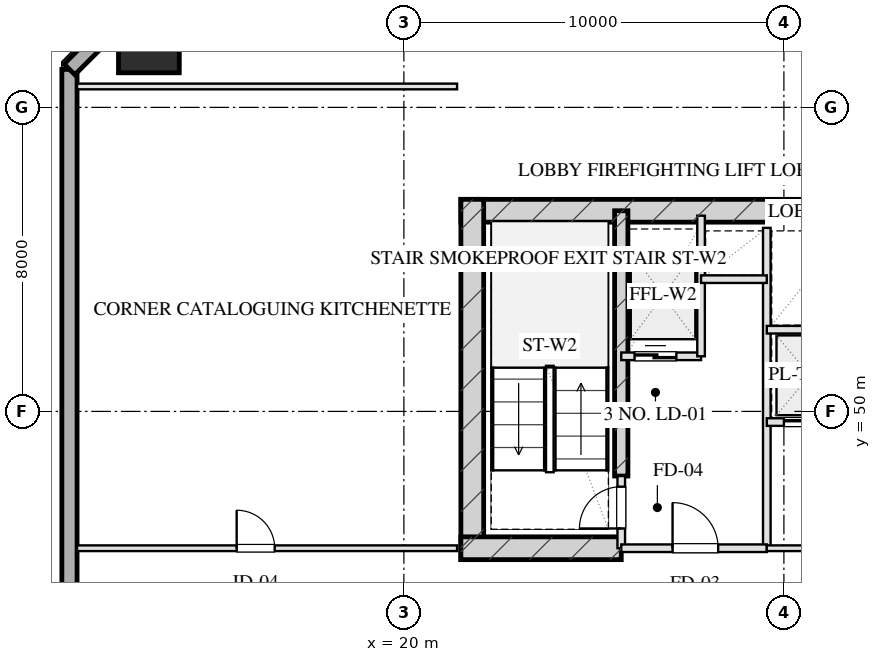
"""IFC4 building model, lengths in metres.
Left out: names, types, materials, properties, quantities, classifications, styles, units other than length and angle.
Written with IfcOpenShell. Run it as: python <this file> out.ifc"""

import sys

from ifc_helpers import new_model, si_unit, direction, frame, frame_2d, origin, origin_2d, place, context, subcontext, project, spatial, rectangle, hollow_rectangle, extrude, element, fill, save


model = new_model("IFC4")
c1 = context("Model", 3, precision=1e-05, world=origin(), true_north=direction((0.0, 1.0)))
c2 = subcontext(c1, "Body", "Model", "MODEL_VIEW")
j1 = project(units=[si_unit("LENGTHUNIT", "METRE"), si_unit("PLANEANGLEUNIT", "RADIAN")], contexts=[c1])
p1 = place(None, origin())
s1 = spatial("IfcSite", under=j1, at=p1, CompositionType="ELEMENT")
p2 = place(p1, origin())
s2 = spatial("IfcBuilding", under=s1, at=p2, CompositionType="ELEMENT")
p3 = place(p2, frame((0.0, 0.0, 117.3)))
s3 = spatial("IfcBuildingStorey", under=s2, at=p3, CompositionType="ELEMENT", Elevation=117.3)
p4 = place(p3, frame((21.5, 55.28, 0.0), z_axis=(0.0, 0.0, 1.0), x_axis=(1.0, 0.0, 0.0)))
e1 = element("IfcWall", 1, at=p4, inside=s3, PredefinedType="SHEAR", context=c2, shape_type="SweptSolid", body=[
    extrude(rectangle(XDim=17.0, YDim=0.6, at=frame_2d((8.5, 0.0))), origin(), (0.0, 0.0, 1.0), 3.45),
])
p5 = place(p3, frame((21.8, 46.1, 0.0), z_axis=(0.0, 0.0, 1.0), x_axis=(0.0, 1.0, 0.0)))
e2 = element("IfcWall", 2, at=p5, inside=s3, PredefinedType="SHEAR", context=c2, shape_type="SweptSolid", body=[
    extrude(rectangle(XDim=9.48, YDim=0.6, at=frame_2d((4.74, 0.0))), origin(), (0.0, 0.0, 1.0), 3.45),
])
p6 = place(p3, frame((25.72, 48.3, 0.0), z_axis=(0.0, 0.0, 1.0), x_axis=(0.0, 1.0, 0.0)))
e3 = element("IfcWall", 3, at=p6, inside=s3, PredefinedType="SHEAR", context=c2, shape_type="SweptSolid", body=[
    extrude(rectangle(XDim=6.98, YDim=0.35, at=frame_2d((3.49, 0.0))), origin(), (0.0, 0.0, 1.0), 3.45),
])
p7 = place(p3, frame((21.5, 46.4, 0.0), z_axis=(0.0, 0.0, 1.0), x_axis=(1.0, 0.0, 0.0)))
e4 = element("IfcWall", 4, at=p7, inside=s3, PredefinedType="SHEAR", context=c2, shape_type="SweptSolid", body=[
    extrude(rectangle(XDim=4.22, YDim=0.6, at=frame_2d((2.11, 0.0))), origin(), (0.0, 0.0, 1.0), 3.45),
])
p8 = place(p3, frame((13.29, 59.71, 0.0), z_axis=(0.0, 0.0, 1.0), x_axis=(1.0, 0.0, 0.0)))
e5 = element("IfcColumn", 5, at=p8, inside=s3, PredefinedType="COLUMN", context=c2, shape_type="SweptSolid", body=[
    extrude(hollow_rectangle(XDim=1.6, YDim=1.6, WallThickness=0.055, at=origin_2d()), origin(), (0.0, 0.0, 1.0), 3.451),
])
p9 = place(p3, frame((11.2, 9.0, 0.0), z_axis=(0.0, 0.0, 1.0), x_axis=(0.0, 1.0, 0.0)))
e6 = element("IfcWall", 6, at=p9, inside=s3, PredefinedType="SOLIDWALL", context=c2, shape_type="SweptSolid", body=[
    extrude(rectangle(XDim=50.0, YDim=0.4, at=frame_2d((25.0, 0.0))), origin(), (0.0, 0.0, 1.0), 2.61),
])
p10 = place(p9, frame((17.4, 0.0, 0.75)))
e7 = element("IfcOpeningElement", 7, at=p10, cuts=e6, PredefinedType="OPENING", context=c2, shape_type="SweptSolid", body=[
    extrude(rectangle(XDim=2.4, YDim=1.46, at=frame_2d((1.2, 0.73))), frame((0.0, 0.21, 0.0), z_axis=(0.0, -1.0, 0.0), x_axis=(1.0, 0.0, 0.0)), (0.0, 0.0, 1.0), 0.42),
])
p11 = place(p9, frame((30.2, 0.0, 0.75)))
e8 = element("IfcOpeningElement", 8, at=p11, cuts=e6, PredefinedType="OPENING", context=c2, shape_type="SweptSolid", body=[
    extrude(rectangle(XDim=2.4, YDim=1.46, at=frame_2d((1.2, 0.73))), frame((0.0, 0.21, 0.0), z_axis=(0.0, -1.0, 0.0), x_axis=(1.0, 0.0, 0.0)), (0.0, 0.0, 1.0), 0.42),
])
p12 = place(p3, frame((11.2, 59.0, 0.0), z_axis=(0.0, 0.0, 1.0), x_axis=(0.707106781187, 0.707106781187, 0.0)))
e9 = element("IfcWall", 9, at=p12, inside=s3, PredefinedType="SOLIDWALL", context=c2, shape_type="SweptSolid", body=[
    extrude(rectangle(XDim=3.96, YDim=0.4, at=frame_2d((1.98, 0.0))), origin(), (0.0, 0.0, 1.0), 2.61),
])
p13 = place(p3, frame((25.72, 46.4, 0.0), z_axis=(0.0, 0.0, 1.0), x_axis=(0.0, 1.0, 0.0)))
e10 = element("IfcWall", 10, at=p13, inside=s3, PredefinedType="PARTITIONING", context=c2, shape_type="SweptSolid", body=[
    extrude(rectangle(XDim=1.9, YDim=0.2, at=frame_2d((0.95, 0.0))), origin(), (0.0, 0.0, 1.0), 3.175),
])
p14 = place(p13, frame((0.52, 0.0, 0.0)))
e11 = element("IfcOpeningElement", 11, at=p14, cuts=e10, PredefinedType="OPENING", context=c2, shape_type="SweptSolid", body=[
    extrude(rectangle(XDim=1.1, YDim=2.05, at=frame_2d((0.55, 1.025))), frame((0.0, 0.11, 0.0), z_axis=(0.0, -1.0, 0.0), x_axis=(1.0, 0.0, 0.0)), (0.0, 0.0, 1.0), 0.22),
])
p15 = place(p3, frame((29.55, 46.4, 0.0), z_axis=(0.0, 0.0, 1.0), x_axis=(0.0, 1.0, 0.0)))
e12 = element("IfcWall", 12, at=p15, inside=s3, PredefinedType="PARTITIONING", context=c2, shape_type="SweptSolid", body=[
    extrude(rectangle(XDim=8.43, YDim=0.2, at=frame_2d((4.215, 0.0))), origin(), (0.0, 0.0, 1.0), 3.175),
])
p16 = place(p3, frame((25.72, 46.4, 0.0), z_axis=(0.0, 0.0, 1.0), x_axis=(1.0, 0.0, 0.0)))
e13 = element("IfcWall", 13, at=p16, inside=s3, PredefinedType="PARTITIONING", context=c2, shape_type="SweptSolid", body=[
    extrude(rectangle(XDim=3.83, YDim=0.2, at=frame_2d((1.915, 0.0))), origin(), (0.0, 0.0, 1.0), 3.175),
])
p17 = place(p16, frame((1.35, 0.0, 0.0)))
e14 = element("IfcOpeningElement", 14, at=p17, cuts=e13, PredefinedType="OPENING", context=c2, shape_type="SweptSolid", body=[
    extrude(rectangle(XDim=1.2, YDim=2.05, at=frame_2d((0.6, 1.025))), frame((0.0, 0.11, 0.0), z_axis=(0.0, -1.0, 0.0), x_axis=(1.0, 0.0, 0.0)), (0.0, 0.0, 1.0), 0.22),
])
p18 = place(p3, frame((25.72, 51.45, 0.0), z_axis=(0.0, 0.0, 1.0), x_axis=(1.0, 0.0, 0.0)))
e15 = element("IfcWall", 15, at=p18, inside=s3, PredefinedType="PARTITIONING", context=c2, shape_type="SweptSolid", body=[
    extrude(rectangle(XDim=2.1, YDim=0.2, at=frame_2d((1.05, 0.0))), origin(), (0.0, 0.0, 1.0), 3.175),
])
p19 = place(p18, frame((0.35, 0.0, 0.0)))
e16 = element("IfcOpeningElement", 16, at=p19, cuts=e15, PredefinedType="OPENING", context=c2, shape_type="SweptSolid", body=[
    extrude(rectangle(XDim=1.1, YDim=2.05, at=frame_2d((0.55, 1.025))), frame((0.0, 0.11, 0.0), z_axis=(0.0, -1.0, 0.0), x_axis=(1.0, 0.0, 0.0)), (0.0, 0.0, 1.0), 0.22),
])
p20 = place(p3, frame((27.82, 51.45, 0.0), z_axis=(0.0, 0.0, 1.0), x_axis=(0.0, 1.0, 0.0)))
e17 = element("IfcWall", 17, at=p20, inside=s3, PredefinedType="PARTITIONING", context=c2, shape_type="SweptSolid", body=[
    extrude(rectangle(XDim=3.7, YDim=0.2, at=frame_2d((1.85, 0.0))), origin(), (0.0, 0.0, 1.0), 3.175),
])
p21 = place(p3, frame((27.82, 53.48, 0.0), z_axis=(0.0, 0.0, 1.0), x_axis=(1.0, 0.0, 0.0)))
e18 = element("IfcWall", 18, at=p21, inside=s3, PredefinedType="PARTITIONING", context=c2, shape_type="SweptSolid", body=[
    extrude(rectangle(XDim=1.73, YDim=0.2, at=frame_2d((0.865, 0.0))), origin(), (0.0, 0.0, 1.0), 3.175),
])
p22 = place(p3, frame((29.55, 46.4, 0.0), z_axis=(0.0, 0.0, 1.0), x_axis=(1.0, 0.0, 0.0)))
e19 = element("IfcWall", 19, at=p22, inside=s3, PredefinedType="PARTITIONING", context=c2, shape_type="SweptSolid", body=[
    extrude(rectangle(XDim=4.4, YDim=0.15, at=frame_2d((2.2, 0.0))), origin(), (0.0, 0.0, 1.0), 3.175),
])
p23 = place(p22, frame((1.45, 0.0, 0.0)))
e20 = element("IfcOpeningElement", 20, at=p23, cuts=e19, PredefinedType="OPENING", context=c2, shape_type="SweptSolid", body=[
    extrude(rectangle(XDim=1.5, YDim=2.05, at=frame_2d((0.75, 1.025))), frame((0.0, 0.085, 0.0), z_axis=(0.0, -1.0, 0.0), x_axis=(1.0, 0.0, 0.0)), (0.0, 0.0, 1.0), 0.17),
])
p24 = place(p3, frame((29.55, 49.72, 0.0), z_axis=(0.0, 0.0, 1.0), x_axis=(1.0, 0.0, 0.0)))
e21 = element("IfcWall", 21, at=p24, inside=s3, PredefinedType="PARTITIONING", context=c2, shape_type="SweptSolid", body=[
    extrude(rectangle(XDim=4.4, YDim=0.2, at=frame_2d((2.2, 0.0))), origin(), (0.0, 0.0, 1.0), 3.175),
])
p25 = place(p24, frame((0.45, 0.0, 0.0)))
e22 = element("IfcOpeningElement", 22, at=p25, cuts=e21, PredefinedType="OPENING", context=c2, shape_type="SweptSolid", body=[
    extrude(rectangle(XDim=1.1, YDim=2.05, at=frame_2d((0.55, 1.025))), frame((0.0, 0.11, 0.0), z_axis=(0.0, -1.0, 0.0), x_axis=(1.0, 0.0, 0.0)), (0.0, 0.0, 1.0), 0.22),
])
p26 = place(p24, frame((2.55, 0.0, 0.0)))
e23 = element("IfcOpeningElement", 23, at=p26, cuts=e21, PredefinedType="OPENING", context=c2, shape_type="SweptSolid", body=[
    extrude(rectangle(XDim=1.1, YDim=2.05, at=frame_2d((0.55, 1.025))), frame((0.0, 0.11, 0.0), z_axis=(0.0, -1.0, 0.0), x_axis=(1.0, 0.0, 0.0)), (0.0, 0.0, 1.0), 0.22),
])
p27 = place(p3, frame((29.55, 52.15, 0.0), z_axis=(0.0, 0.0, 1.0), x_axis=(1.0, 0.0, 0.0)))
e24 = element("IfcWall", 24, at=p27, inside=s3, PredefinedType="PARTITIONING", context=c2, shape_type="SweptSolid", body=[
    extrude(rectangle(XDim=4.4, YDim=0.2, at=frame_2d((2.2, 0.0))), origin(), (0.0, 0.0, 1.0), 3.175),
])
p28 = place(p3, frame((11.4, 58.55, 0.0), z_axis=(0.0, 0.0, 1.0), x_axis=(1.0, 0.0, 0.0)))
e25 = element("IfcWall", 25, at=p28, inside=s3, PredefinedType="PARTITIONING", context=c2, shape_type="SweptSolid", body=[
    extrude(rectangle(XDim=10.0, YDim=0.15, at=frame_2d((5.0, 0.0))), origin(), (0.0, 0.0, 1.0), 3.175),
])
p29 = place(p3, frame((11.4, 46.4, 0.0), z_axis=(0.0, 0.0, 1.0), x_axis=(1.0, 0.0, 0.0)))
e26 = element("IfcWall", 26, at=p29, inside=s3, PredefinedType="PARTITIONING", context=c2, shape_type="SweptSolid", body=[
    extrude(rectangle(XDim=10.0, YDim=0.15, at=frame_2d((5.0, 0.0))), origin(), (0.0, 0.0, 1.0), 3.175),
])
p30 = place(p29, frame((4.2, 0.0, 0.0)))
e27 = element("IfcOpeningElement", 27, at=p30, cuts=e26, PredefinedType="OPENING", context=c2, shape_type="SweptSolid", body=[
    extrude(rectangle(XDim=1.0, YDim=2.05, at=frame_2d((0.5, 1.025))), frame((0.0, 0.085, 0.0), z_axis=(0.0, -1.0, 0.0), x_axis=(1.0, 0.0, 0.0)), (0.0, 0.0, 1.0), 0.17),
])
p31 = place(p14, origin())
e28 = element("IfcDoor", 28, at=p31, inside=s3, OperationType="SINGLE_SWING_LEFT", PredefinedType="DOOR", context=c2, shape_type="SweptSolid", body=[
    extrude(rectangle(XDim=1.1, YDim=2.05, at=frame_2d((0.55, 1.025))), frame((0.0, 0.025, 0.0), z_axis=(0.0, -1.0, 0.0), x_axis=(1.0, 0.0, 0.0)), (0.0, 0.0, 1.0), 0.05),
])
fill(e11, e28)
p32 = place(p17, origin())
e29 = element("IfcDoor", 29, at=p32, inside=s3, OperationType="SINGLE_SWING_LEFT", PredefinedType="DOOR", context=c2, shape_type="SweptSolid", body=[
    extrude(rectangle(XDim=1.2, YDim=2.05, at=frame_2d((0.6, 1.025))), frame((0.0, 0.025, 0.0), z_axis=(0.0, -1.0, 0.0), x_axis=(1.0, 0.0, 0.0)), (0.0, 0.0, 1.0), 0.05),
])
fill(e14, e29)
p33 = place(p19, origin())
e30 = element("IfcDoor", 30, at=p33, inside=s3, OperationType="DOUBLE_DOOR_SLIDING", PredefinedType="DOOR", context=c2, shape_type="SweptSolid", body=[
    extrude(rectangle(XDim=1.1, YDim=2.05, at=frame_2d((0.55, 1.025))), frame((0.0, 0.025, 0.0), z_axis=(0.0, -1.0, 0.0), x_axis=(1.0, 0.0, 0.0)), (0.0, 0.0, 1.0), 0.05),
])
fill(e16, e30)
p34 = place(p25, origin())
e31 = element("IfcDoor", 31, at=p34, inside=s3, OperationType="DOUBLE_DOOR_SLIDING", PredefinedType="DOOR", context=c2, shape_type="SweptSolid", body=[
    extrude(rectangle(XDim=1.1, YDim=2.05, at=frame_2d((0.55, 1.025))), frame((0.0, 0.025, 0.0), z_axis=(0.0, -1.0, 0.0), x_axis=(1.0, 0.0, 0.0)), (0.0, 0.0, 1.0), 0.05),
])
fill(e22, e31)
p35 = place(p30, origin())
e32 = element("IfcDoor", 32, at=p35, inside=s3, OperationType="SINGLE_SWING_LEFT", PredefinedType="DOOR", context=c2, shape_type="SweptSolid", body=[
    extrude(rectangle(XDim=1.0, YDim=2.05, at=frame_2d((0.5, 1.025))), frame((0.0, 0.025, 0.0), z_axis=(0.0, -1.0, 0.0), x_axis=(1.0, 0.0, 0.0)), (0.0, 0.0, 1.0), 0.05),
])
fill(e27, e32)
save(model, sys.argv[1])
